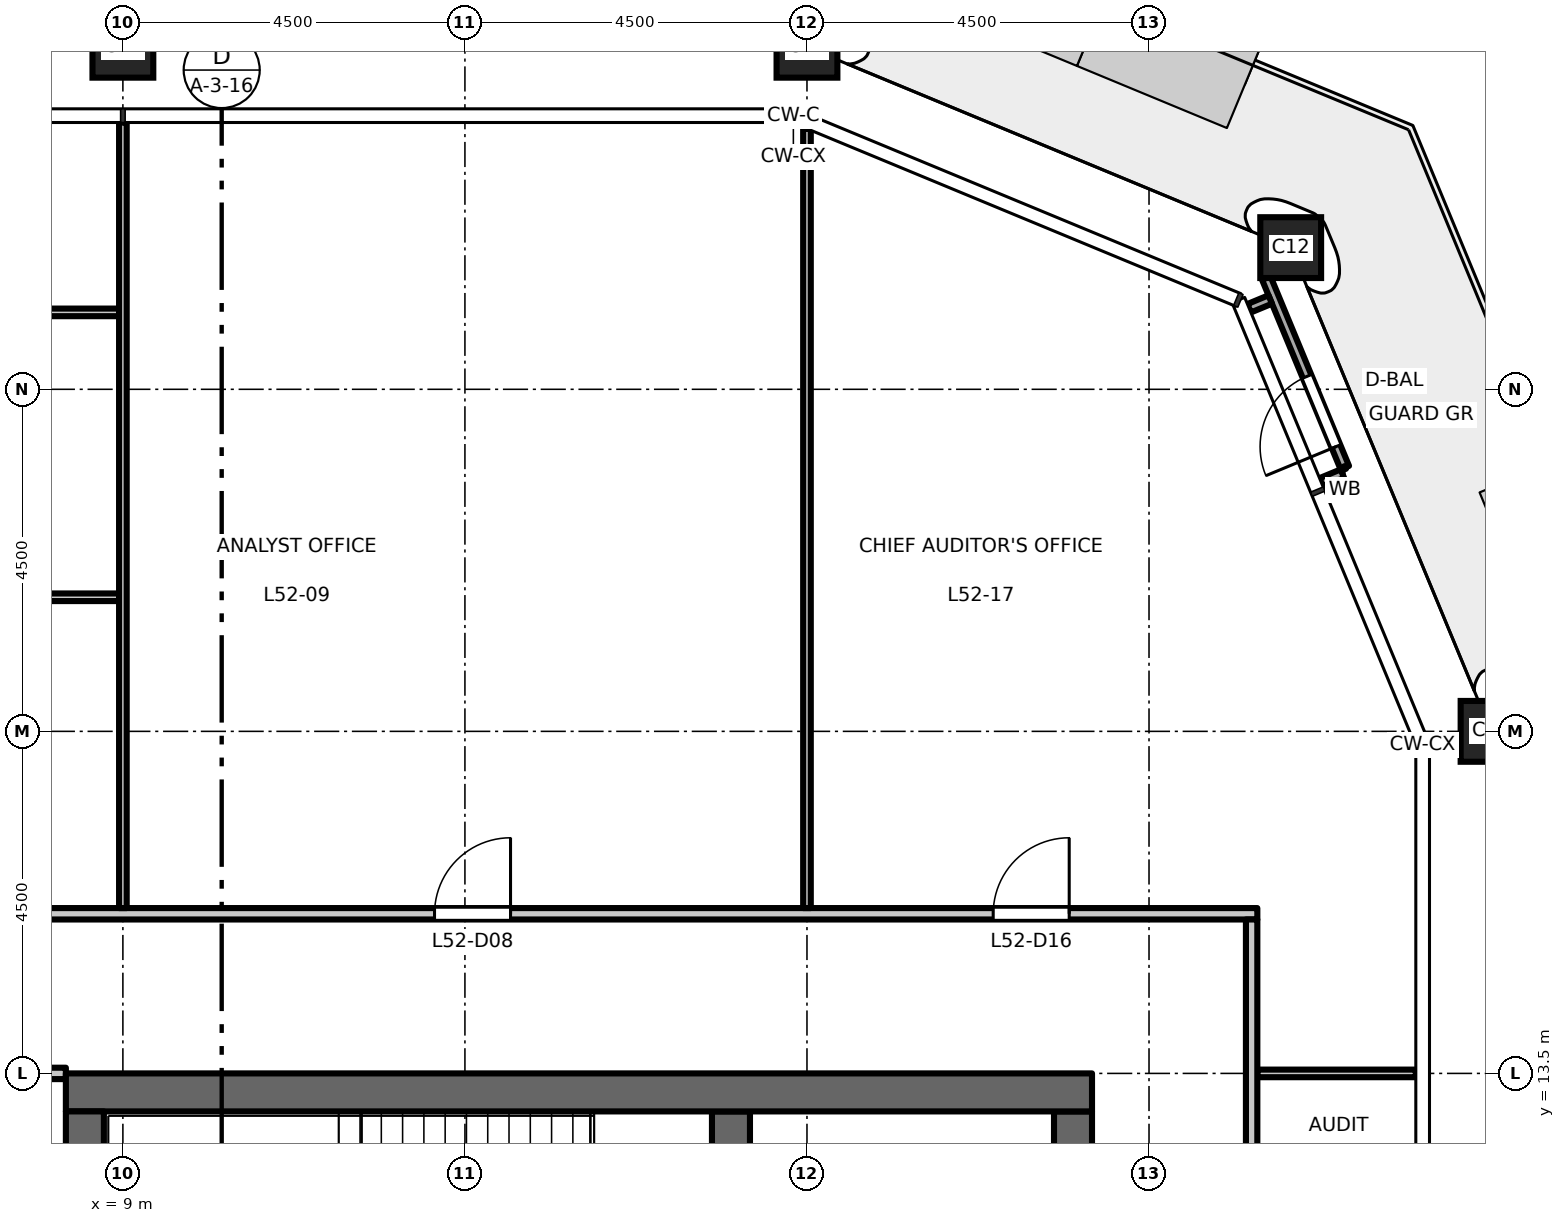
"""IFC4 building model, lengths in metres.
Left out: names, types, materials, properties, quantities, classifications, styles, units other than length and angle.
Written with IfcOpenShell. Run it as: python <this file> out.ifc"""

import sys

from ifc_helpers import new_model, si_unit, direction, frame, frame_2d, origin, origin_2d, place, context, subcontext, project, spatial, rectangle, hollow_rectangle, extrude, element, fill, save


model = new_model("IFC4")
c1 = context("Model", 3, precision=1e-05, world=origin(), true_north=direction((0.0, 1.0)))
c2 = subcontext(c1, "Body", "Model", "MODEL_VIEW")
j1 = project(units=[si_unit("LENGTHUNIT", "METRE"), si_unit("PLANEANGLEUNIT", "RADIAN")], contexts=[c1])
p1 = place(None, origin())
s1 = spatial("IfcSite", under=j1, at=p1, CompositionType="ELEMENT")
p2 = place(p1, origin())
s2 = spatial("IfcBuilding", under=s1, at=p2, CompositionType="ELEMENT")
p3 = place(p2, frame((0.0, 0.0, 242.2)))
s3 = spatial("IfcBuildingStorey", under=s2, at=p3, CompositionType="ELEMENT", Elevation=242.2)
for number, where, z_axis, x_axis in (
    (1, (27.0, 18.0, 0.0), (0.0, 0.0, 1.0), (1.0, 0.0, 0.0)),
    (2, (24.364, 24.364, 0.0), (0.0, 0.0, 1.0), (1.0, 0.0, 0.0)),
    (3, (18.0, 27.0, 0.0), (0.0, 0.0, 1.0), (1.0, 0.0, 0.0)),
    (4, (9.0, 27.0, 0.0), (0.0, 0.0, 1.0), (1.0, 0.0, 0.0)),
):
    element("IfcColumn", number, at=place(p3, frame(where, z_axis=z_axis, x_axis=x_axis)), inside=s3, PredefinedType="COLUMN", context=c2, shape_type="SweptSolid", body=[
        extrude(hollow_rectangle(XDim=0.8, YDim=0.8, WallThickness=0.045, at=origin_2d()), origin(), (0.0, 0.0, 1.0), 4.5),
    ])
p4 = place(p3, frame((21.5, -13.0, 0.0), z_axis=(0.0, 0.0, 1.0), x_axis=(0.0, 1.0, 0.0)))
e5 = element("IfcWall", 5, at=p4, inside=s3, PredefinedType="SHEAR", context=c2, shape_type="SweptSolid", body=[
    extrude(rectangle(XDim=26.0, YDim=0.5, at=frame_2d((13.0, 0.0))), origin(), (0.0, 0.0, 1.0), 4.35),
])
p5 = place(p4, frame((16.825, 0.0, 0.0)))
e6 = element("IfcOpeningElement", 6, at=p5, cuts=e5, PredefinedType="OPENING", context=c2, shape_type="SweptSolid", body=[
    extrude(rectangle(XDim=1.8, YDim=2.1, at=frame_2d((0.9, 1.05))), frame((0.0, 0.26, 0.0), z_axis=(0.0, -1.0, 0.0), x_axis=(1.0, 0.0, 0.0)), (0.0, 0.0, 1.0), 0.52),
])
p6 = place(p4, frame((7.375, 0.0, 0.0)))
e7 = element("IfcOpeningElement", 7, at=p6, cuts=e5, PredefinedType="OPENING", context=c2, shape_type="SweptSolid", body=[
    extrude(rectangle(XDim=1.8, YDim=2.1, at=frame_2d((0.9, 1.05))), frame((0.0, 0.26, 0.0), z_axis=(0.0, -1.0, 0.0), x_axis=(1.0, 0.0, 0.0)), (0.0, 0.0, 1.0), 0.52),
])
p7 = place(p3, frame((17.0, 6.425, 0.0), z_axis=(0.0, 0.0, 1.0), x_axis=(0.0, 1.0, 0.0)))
e8 = element("IfcWall", 8, at=p7, inside=s3, PredefinedType="SHEAR", context=c2, shape_type="SweptSolid", body=[
    extrude(rectangle(XDim=6.575, YDim=0.5, at=frame_2d((3.288, 0.0))), origin(), (0.0, 0.0, 1.0), 4.35),
])
p8 = place(p3, frame((8.25, 13.25, 0.0), z_axis=(0.0, 0.0, 1.0), x_axis=(1.0, 0.0, 0.0)))
e9 = element("IfcWall", 9, at=p8, inside=s3, PredefinedType="SHEAR", context=c2, shape_type="SweptSolid", body=[
    extrude(rectangle(XDim=13.5, YDim=0.5, at=frame_2d((6.75, 0.0))), origin(), (0.0, 0.0, 1.0), 4.35),
])
p9 = place(p3, frame((8.5, -13.0, 0.0), z_axis=(0.0, 0.0, 1.0), x_axis=(0.0, 1.0, 0.0)))
e10 = element("IfcWall", 10, at=p9, inside=s3, PredefinedType="SHEAR", context=c2, shape_type="SweptSolid", body=[
    extrude(rectangle(XDim=26.0, YDim=0.5, at=frame_2d((13.0, 0.0))), origin(), (0.0, 0.0, 1.0), 4.35),
])
p10 = place(p3, frame((24.766, 21.276, 0.0), z_axis=(0.0, 0.0, 1.0), x_axis=(0.923917630863, 0.382591441855, 0.0)))
e11 = element("IfcWall", 11, at=p10, inside=s3, PredefinedType="STANDARD", context=c2, shape_type="SweptSolid", body=[
    extrude(rectangle(XDim=0.3, YDim=0.12, at=frame_2d((0.15, 0.0))), origin(), (0.0, 0.0, 1.0), 4.35),
])
p11 = place(p3, frame((23.818, 23.566, 0.0), z_axis=(0.0, 0.0, 1.0), x_axis=(0.923629715641, 0.383285987724, 0.0)))
e12 = element("IfcWall", 12, at=p11, inside=s3, PredefinedType="STANDARD", context=c2, shape_type="SweptSolid", body=[
    extrude(rectangle(XDim=0.3, YDim=0.12, at=frame_2d((0.15, 0.0))), origin(), (0.0, 0.0, 1.0), 4.35),
])
p12 = place(p3, frame((25.076, 21.469, 0.0), z_axis=(0.0, 0.0, 1.0), x_axis=(-0.382695131424, 0.923874686516, 0.0)))
e13 = element("IfcWall", 13, at=p12, inside=s3, PredefinedType="STANDARD", context=c2, shape_type="SweptSolid", body=[
    extrude(rectangle(XDim=2.7, YDim=0.12, at=frame_2d((1.35, 0.0))), origin(), (0.0, 0.0, 1.0), 4.35),
])
p13 = place(p12, frame((0.3, 0.0, 0.0)))
e14 = element("IfcOpeningElement", 14, at=p13, cuts=e13, PredefinedType="OPENING", context=c2, shape_type="SweptSolid", body=[
    extrude(rectangle(XDim=1.0, YDim=2.4, at=frame_2d((0.5, 1.2))), frame((0.0, 0.07, 0.0), z_axis=(0.0, -1.0, 0.0), x_axis=(1.0, 0.0, 0.0)), (0.0, 0.0, 1.0), 0.14),
])
p14 = place(p3, frame((23.925, 13.5, 0.0), z_axis=(0.0, 0.0, 1.0), x_axis=(1.0, 0.0, 0.0)))
e15 = element("IfcWall", 15, at=p14, inside=s3, PredefinedType="PARTITIONING", context=c2, shape_type="SweptSolid", body=[
    extrude(rectangle(XDim=2.085, YDim=0.1, at=frame_2d((1.042, 0.0))), origin(), (0.0, 0.0, 1.0), 4.35),
])
p15 = place(p3, frame((-8.25, 13.5, 0.0), z_axis=(0.0, 0.0, 1.0), x_axis=(1.0, 0.0, 0.0)))
e16 = element("IfcWall", 16, at=p15, inside=s3, PredefinedType="PARTITIONING", context=c2, shape_type="SweptSolid", body=[
    extrude(rectangle(XDim=16.5, YDim=0.15, at=frame_2d((8.25, 0.0))), origin(), (0.0, 0.0, 1.0), 4.35),
])
p16 = place(p15, frame((3.65, 0.0, 0.0)))
e17 = element("IfcOpeningElement", 17, at=p16, cuts=e16, PredefinedType="OPENING", context=c2, shape_type="SweptSolid", body=[
    extrude(rectangle(XDim=1.0, YDim=2.1, at=frame_2d((0.5, 1.05))), frame((0.0, 0.085, 0.0), z_axis=(0.0, -1.0, 0.0), x_axis=(1.0, 0.0, 0.0)), (0.0, 0.0, 1.0), 0.17),
])
p17 = place(p15, frame((11.9, 0.0, 0.0)))
e18 = element("IfcOpeningElement", 18, at=p17, cuts=e16, PredefinedType="OPENING", context=c2, shape_type="SweptSolid", body=[
    extrude(rectangle(XDim=1.0, YDim=2.1, at=frame_2d((0.5, 1.05))), frame((0.0, 0.085, 0.0), z_axis=(0.0, -1.0, 0.0), x_axis=(1.0, 0.0, 0.0)), (0.0, 0.0, 1.0), 0.17),
])
p18 = place(p3, frame((-23.925, 15.6, 0.0), z_axis=(0.0, 0.0, 1.0), x_axis=(1.0, 0.0, 0.0)))
e19 = element("IfcWall", 19, at=p18, inside=s3, PredefinedType="PARTITIONING", context=c2, shape_type="SweptSolid", body=[
    extrude(rectangle(XDim=47.85, YDim=0.15, at=frame_2d((23.925, 0.0))), origin(), (0.0, 0.0, 1.0), 4.35),
])
p19 = place(p18, frame((10.025, 0.0, 0.0)))
e20 = element("IfcOpeningElement", 20, at=p19, cuts=e19, PredefinedType="OPENING", context=c2, shape_type="SweptSolid", body=[
    extrude(rectangle(XDim=1.0, YDim=2.1, at=frame_2d((0.5, 1.05))), frame((0.0, 0.085, 0.0), z_axis=(0.0, -1.0, 0.0), x_axis=(1.0, 0.0, 0.0)), (0.0, 0.0, 1.0), 0.17),
])
p20 = place(p18, frame((19.025, 0.0, 0.0)))
e21 = element("IfcOpeningElement", 21, at=p20, cuts=e19, PredefinedType="OPENING", context=c2, shape_type="SweptSolid", body=[
    extrude(rectangle(XDim=1.0, YDim=2.1, at=frame_2d((0.5, 1.05))), frame((0.0, 0.085, 0.0), z_axis=(0.0, -1.0, 0.0), x_axis=(1.0, 0.0, 0.0)), (0.0, 0.0, 1.0), 0.17),
])
p21 = place(p18, frame((28.025, 0.0, 0.0)))
e22 = element("IfcOpeningElement", 22, at=p21, cuts=e19, PredefinedType="OPENING", context=c2, shape_type="SweptSolid", body=[
    extrude(rectangle(XDim=1.0, YDim=2.1, at=frame_2d((0.5, 1.05))), frame((0.0, 0.085, 0.0), z_axis=(0.0, -1.0, 0.0), x_axis=(1.0, 0.0, 0.0)), (0.0, 0.0, 1.0), 0.17),
])
p22 = place(p18, frame((37.025, 0.0, 0.0)))
e23 = element("IfcOpeningElement", 23, at=p22, cuts=e19, PredefinedType="OPENING", context=c2, shape_type="SweptSolid", body=[
    extrude(rectangle(XDim=1.0, YDim=2.1, at=frame_2d((0.5, 1.05))), frame((0.0, 0.085, 0.0), z_axis=(0.0, -1.0, 0.0), x_axis=(1.0, 0.0, 0.0)), (0.0, 0.0, 1.0), 0.17),
])
p23 = place(p18, frame((2.525, 0.0, 0.0)))
e24 = element("IfcOpeningElement", 24, at=p23, cuts=e19, PredefinedType="OPENING", context=c2, shape_type="SweptSolid", body=[
    extrude(rectangle(XDim=1.0, YDim=2.1, at=frame_2d((0.5, 1.05))), frame((0.0, 0.085, 0.0), z_axis=(0.0, -1.0, 0.0), x_axis=(1.0, 0.0, 0.0)), (0.0, 0.0, 1.0), 0.17),
])
p24 = place(p18, frame((44.375, 0.0, 0.0)))
e25 = element("IfcOpeningElement", 25, at=p24, cuts=e19, PredefinedType="OPENING", context=c2, shape_type="SweptSolid", body=[
    extrude(rectangle(XDim=1.0, YDim=2.1, at=frame_2d((0.5, 1.05))), frame((0.0, 0.085, 0.0), z_axis=(0.0, -1.0, 0.0), x_axis=(1.0, 0.0, 0.0)), (0.0, 0.0, 1.0), 0.17),
])
p25 = place(p3, frame((0.05, 19.764, 0.0), z_axis=(0.0, 0.0, 1.0), x_axis=(1.0, 0.0, 0.0)))
e26 = element("IfcWall", 26, at=p25, inside=s3, PredefinedType="PARTITIONING", context=c2, shape_type="SweptSolid", body=[
    extrude(rectangle(XDim=8.9, YDim=0.1, at=frame_2d((4.45, 0.0))), origin(), (0.0, 0.0, 1.0), 4.35),
])
p26 = place(p25, frame((4.05, 0.0, 0.0)))
e27 = element("IfcOpeningElement", 27, at=p26, cuts=e26, PredefinedType="OPENING", context=c2, shape_type="SweptSolid", body=[
    extrude(rectangle(XDim=1.0, YDim=2.1, at=frame_2d((0.5, 1.05))), frame((0.0, 0.06, 0.0), z_axis=(0.0, -1.0, 0.0), x_axis=(1.0, 0.0, 0.0)), (0.0, 0.0, 1.0), 0.12),
])
p27 = place(p3, frame((0.05, 23.512, 0.0), z_axis=(0.0, 0.0, 1.0), x_axis=(1.0, 0.0, 0.0)))
e28 = element("IfcWall", 28, at=p27, inside=s3, PredefinedType="PARTITIONING", context=c2, shape_type="SweptSolid", body=[
    extrude(rectangle(XDim=8.9, YDim=0.1, at=frame_2d((4.45, 0.0))), origin(), (0.0, 0.0, 1.0), 4.35),
])
p28 = place(p27, frame((4.05, 0.0, 0.0)))
e29 = element("IfcOpeningElement", 29, at=p28, cuts=e28, PredefinedType="OPENING", context=c2, shape_type="SweptSolid", body=[
    extrude(rectangle(XDim=1.0, YDim=2.1, at=frame_2d((0.5, 1.05))), frame((0.0, 0.06, 0.0), z_axis=(0.0, -1.0, 0.0), x_axis=(1.0, 0.0, 0.0)), (0.0, 0.0, 1.0), 0.12),
])
p29 = place(p3, frame((9.0, 15.675, 0.0), z_axis=(0.0, 0.0, 1.0), x_axis=(0.0, 1.0, 0.0)))
e30 = element("IfcWall", 30, at=p29, inside=s3, PredefinedType="PARTITIONING", context=c2, shape_type="SweptSolid", body=[
    extrude(rectangle(XDim=10.335, YDim=0.1, at=frame_2d((5.167, 0.0))), origin(), (0.0, 0.0, 1.0), 3.65),
])
p30 = place(p3, frame((18.0, 15.675, 0.0), z_axis=(0.0, 0.0, 1.0), x_axis=(0.0, 1.0, 0.0)))
e31 = element("IfcWall", 31, at=p30, inside=s3, PredefinedType="PARTITIONING", context=c2, shape_type="SweptSolid", body=[
    extrude(rectangle(XDim=10.253, YDim=0.1, at=frame_2d((5.126, 0.0))), origin(), (0.0, 0.0, 1.0), 3.65),
])
p31 = place(p3, frame((23.85, -15.525, 0.0), z_axis=(0.0, 0.0, 1.0), x_axis=(0.0, 1.0, 0.0)))
e32 = element("IfcWall", 32, at=p31, inside=s3, PredefinedType="PARTITIONING", context=c2, shape_type="SweptSolid", body=[
    extrude(rectangle(XDim=31.05, YDim=0.15, at=frame_2d((15.525, 0.0))), origin(), (0.0, 0.0, 1.0), 4.35),
])
p32 = place(p31, frame((3.675, 0.0, 0.0)))
e33 = element("IfcOpeningElement", 33, at=p32, cuts=e32, PredefinedType="OPENING", context=c2, shape_type="SweptSolid", body=[
    extrude(rectangle(XDim=1.0, YDim=2.1, at=frame_2d((0.5, 1.05))), frame((0.0, 0.085, 0.0), z_axis=(0.0, -1.0, 0.0), x_axis=(1.0, 0.0, 0.0)), (0.0, 0.0, 1.0), 0.17),
])
p33 = place(p31, frame((10.425, 0.0, 0.0)))
e34 = element("IfcOpeningElement", 34, at=p33, cuts=e32, PredefinedType="OPENING", context=c2, shape_type="SweptSolid", body=[
    extrude(rectangle(XDim=1.0, YDim=2.1, at=frame_2d((0.5, 1.05))), frame((0.0, 0.085, 0.0), z_axis=(0.0, -1.0, 0.0), x_axis=(1.0, 0.0, 0.0)), (0.0, 0.0, 1.0), 0.17),
])
p34 = place(p31, frame((19.425, 0.0, 0.0)))
e35 = element("IfcOpeningElement", 35, at=p34, cuts=e32, PredefinedType="OPENING", context=c2, shape_type="SweptSolid", body=[
    extrude(rectangle(XDim=1.0, YDim=2.1, at=frame_2d((0.5, 1.05))), frame((0.0, 0.085, 0.0), z_axis=(0.0, -1.0, 0.0), x_axis=(1.0, 0.0, 0.0)), (0.0, 0.0, 1.0), 0.17),
])
p35 = place(p31, frame((26.175, 0.0, 0.0)))
e36 = element("IfcOpeningElement", 36, at=p35, cuts=e32, PredefinedType="OPENING", context=c2, shape_type="SweptSolid", body=[
    extrude(rectangle(XDim=1.0, YDim=2.1, at=frame_2d((0.5, 1.05))), frame((0.0, 0.085, 0.0), z_axis=(0.0, -1.0, 0.0), x_axis=(1.0, 0.0, 0.0)), (0.0, 0.0, 1.0), 0.17),
])
p36 = place(p13, origin())
e37 = element("IfcDoor", 37, at=p36, inside=s3, OperationType="SINGLE_SWING_LEFT", PredefinedType="DOOR", context=c2, shape_type="SweptSolid", body=[
    extrude(rectangle(XDim=1.0, YDim=2.4, at=frame_2d((0.5, 1.2))), frame((0.0, 0.025, 0.0), z_axis=(0.0, -1.0, 0.0), x_axis=(1.0, 0.0, 0.0)), (0.0, 0.0, 1.0), 0.05),
])
fill(e14, e37)
p37 = place(p22, origin())
e38 = element("IfcDoor", 38, at=p37, inside=s3, OperationType="SINGLE_SWING_RIGHT", PredefinedType="DOOR", context=c2, shape_type="SweptSolid", body=[
    extrude(rectangle(XDim=1.0, YDim=2.1, at=frame_2d((0.5, 1.05))), frame((0.0, 0.025, 0.0), z_axis=(0.0, -1.0, 0.0), x_axis=(1.0, 0.0, 0.0)), (0.0, 0.0, 1.0), 0.05),
])
fill(e23, e38)
p38 = place(p24, origin())
e39 = element("IfcDoor", 39, at=p38, inside=s3, OperationType="SINGLE_SWING_RIGHT", PredefinedType="DOOR", context=c2, shape_type="SweptSolid", body=[
    extrude(rectangle(XDim=1.0, YDim=2.1, at=frame_2d((0.5, 1.05))), frame((0.0, 0.025, 0.0), z_axis=(0.0, -1.0, 0.0), x_axis=(1.0, 0.0, 0.0)), (0.0, 0.0, 1.0), 0.05),
])
fill(e25, e39)
save(model, sys.argv[1])
